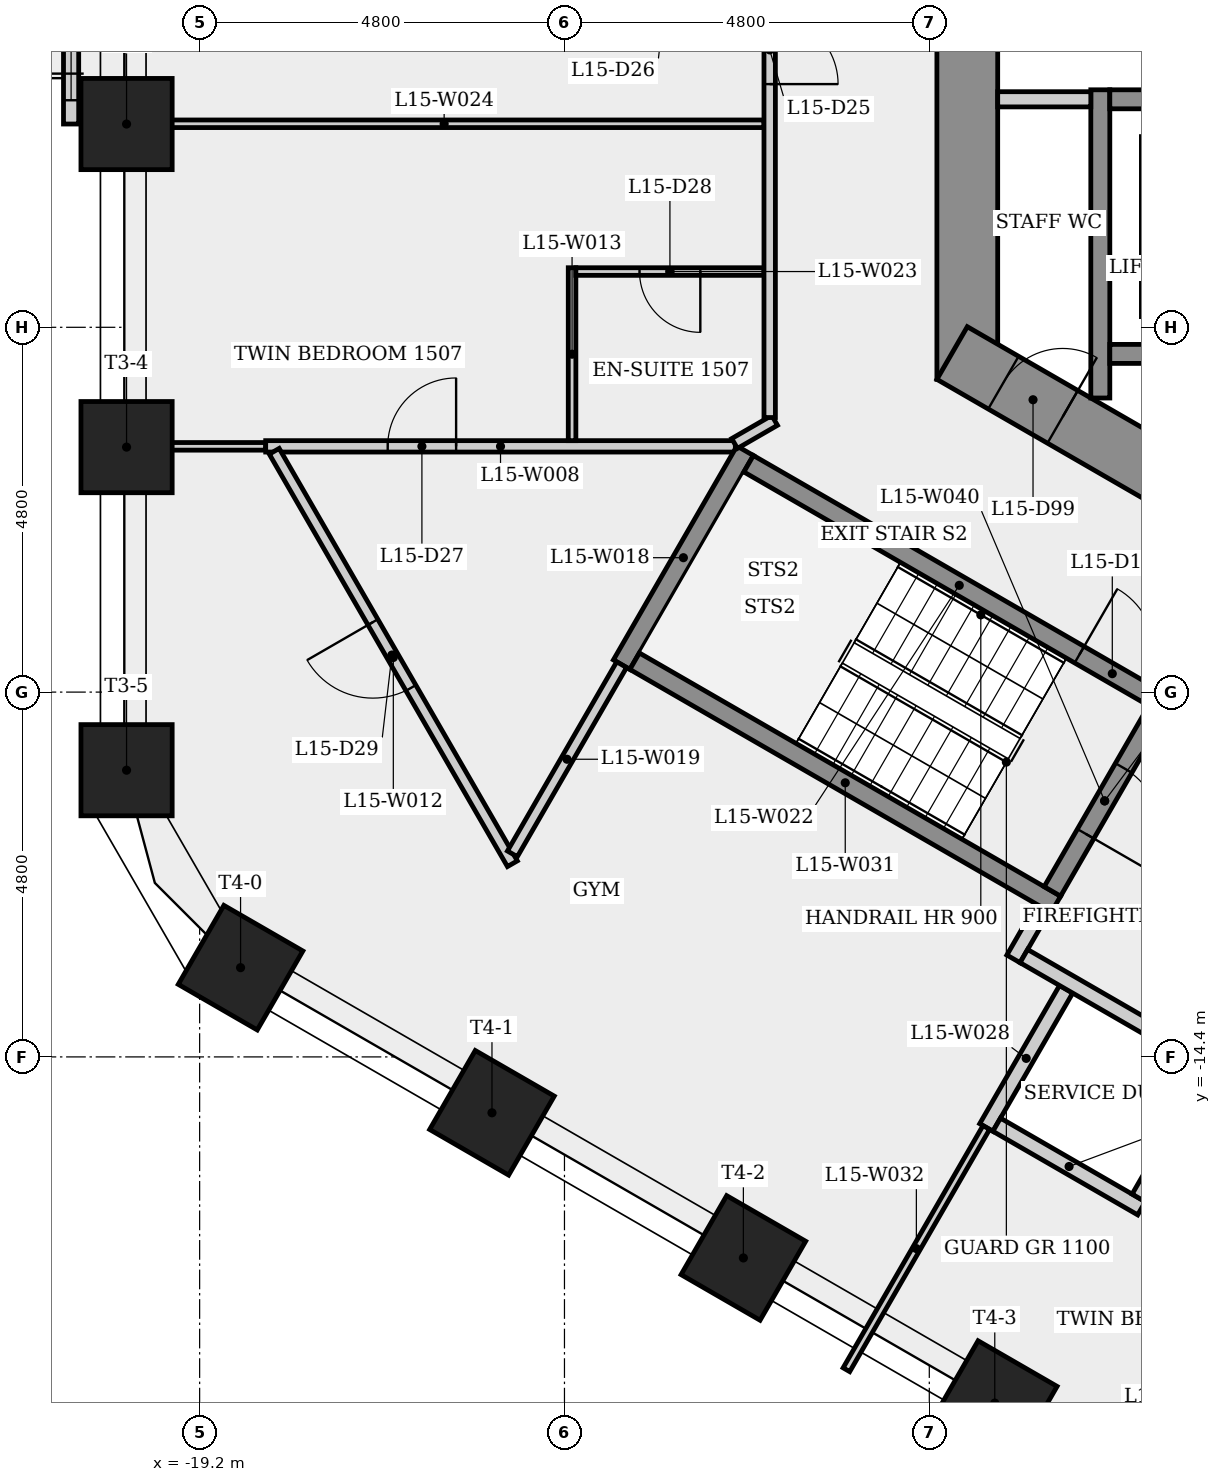
"""IFC4 building model, lengths in metres.
Left out: names, types, materials, properties, quantities, classifications, styles, units other than length and angle.
Written with IfcOpenShell. Run it as: python <this file> out.ifc"""

import sys

from ifc_helpers import new_model, si_unit, direction, frame, frame_2d, origin, origin_2d, place, context, subcontext, project, spatial, rectangle, extrude, element, fill, save


model = new_model("IFC4")
c1 = context("Model", 3, precision=1e-05, world=origin(), true_north=direction((0.0, 1.0)))
c2 = subcontext(c1, "Body", "Model", "MODEL_VIEW")
j1 = project(units=[si_unit("LENGTHUNIT", "METRE"), si_unit("PLANEANGLEUNIT", "RADIAN")], contexts=[c1])
p1 = place(None, origin())
s1 = spatial("IfcSite", under=j1, at=p1, CompositionType="ELEMENT")
p2 = place(p1, origin())
s2 = spatial("IfcBuilding", under=s1, at=p2, CompositionType="ELEMENT")
p3 = place(p2, frame((0.0, 0.0, 59.5)))
s3 = spatial("IfcBuildingStorey", under=s2, at=p3, CompositionType="ELEMENT", Elevation=59.5)
p4 = place(p3, frame((-9.1, 5.485, 0.0), z_axis=(0.0, 0.0, 1.0), x_axis=(0.0, -1.0, 0.0)))
e1 = element("IfcWall", 1, at=p4, inside=s3, PredefinedType="SHEAR", context=c2, shape_type="SweptSolid", body=[
    extrude(rectangle(XDim=10.97, YDim=0.8, at=frame_2d((5.485, 0.0))), origin(), (0.0, 0.0, 1.0), 3.4),
])
p5 = place(p4, frame((4.685, 0.0, 0.0)))
e2 = element("IfcOpeningElement", 2, at=p5, cuts=e1, PredefinedType="OPENING", context=c2, shape_type="SweptSolid", body=[
    extrude(rectangle(XDim=1.6, YDim=2.1, at=frame_2d((0.8, 1.05))), frame((0.0, 0.41, 0.0), z_axis=(0.0, -1.0, 0.0), x_axis=(1.0, 0.0, 0.0)), (0.0, 0.0, 1.0), 0.82),
])
p6 = place(p3, frame((-9.3, -5.138, 0.0), z_axis=(0.0, 0.0, 1.0), x_axis=(0.866023993627, -0.500002442456, 0.0)))
e3 = element("IfcWall", 3, at=p6, inside=s3, PredefinedType="SHEAR", context=c2, shape_type="SweptSolid", body=[
    extrude(rectangle(XDim=10.97, YDim=0.8, at=frame_2d((5.485, 0.0))), origin(), (0.0, 0.0, 1.0), 3.4),
])
p7 = place(p6, frame((0.78, 0.0, 0.0)))
e4 = element("IfcOpeningElement", 4, at=p7, cuts=e3, PredefinedType="OPENING", context=c2, shape_type="SweptSolid", body=[
    extrude(rectangle(XDim=0.9, YDim=2.1, at=frame_2d((0.45, 1.05))), frame((0.0, 0.41, 0.0), z_axis=(0.0, -1.0, 0.0), x_axis=(1.0, 0.0, 0.0)), (0.0, 0.0, 1.0), 0.82),
])
for number, where, z_axis, x_axis in (
    (5, (-20.161, -2.125, 0.0), (0.0, 0.0, 1.0), (-1.0, 0.0, 0.0)),
    (6, (-20.161, -6.377, 0.0), (0.0, 0.0, 1.0), (-1.0, 0.0, 0.0)),
    (7, (-20.161, -10.628, 0.0), (0.0, 0.0, 1.0), (-1.0, 0.0, 0.0)),
    (8, (-18.661, -13.226, 0.0), (0.0, 0.0, 1.0), (-0.5, -0.866, 0.0)),
    (9, (-15.354, -15.135, 0.0), (0.0, 0.0, 1.0), (-0.5, -0.866, 0.0)),
    (10, (-12.046, -17.045, 0.0), (0.0, 0.0, 1.0), (-0.5, -0.866, 0.0)),
    (11, (-8.739, -18.955, 0.0), (0.0, 0.0, 1.0), (-0.5, -0.866, 0.0)),
):
    element("IfcColumn", number, at=place(p3, frame(where, z_axis=z_axis, x_axis=x_axis)), inside=s3, PredefinedType="COLUMN", context=c2, shape_type="SweptSolid", body=[
        extrude(rectangle(XDim=1.2, YDim=1.2, at=origin_2d()), origin(), (0.0, 0.0, 1.0), 3.4),
    ])
p8 = place(p3, frame((-20.891, 2.126, 0.0), z_axis=(0.0, 0.0, 1.0), x_axis=(0.0, -1.0, 0.0)))
e12 = element("IfcWall", 12, at=p8, inside=s3, PredefinedType="SOLIDWALL", context=c2, shape_type="SweptSolid", body=[
    extrude(rectangle(XDim=4.251, YDim=0.2, at=frame_2d((2.125, 0.0))), origin(), (0.0, 0.0, 1.0), 3.4),
])
p9 = place(p8, frame((1.625, 0.0, 0.0)))
e13 = element("IfcOpeningElement", 13, at=p9, cuts=e12, PredefinedType="OPENING", context=c2, shape_type="SweptSolid", body=[
    extrude(rectangle(XDim=1.0, YDim=2.4, at=frame_2d((0.5, 1.2))), frame((0.0, 0.11, 0.0), z_axis=(0.0, -1.0, 0.0), x_axis=(1.0, 0.0, 0.0)), (0.0, 0.0, 1.0), 0.22),
])
p10 = place(p8, frame((0.313, 0.0, 0.9)))
e14 = element("IfcOpeningElement", 14, at=p10, cuts=e12, PredefinedType="OPENING", context=c2, shape_type="SweptSolid", body=[
    extrude(rectangle(XDim=1.0, YDim=1.5, at=frame_2d((0.5, 0.75))), frame((0.0, 0.11, 0.0), z_axis=(0.0, -1.0, 0.0), x_axis=(1.0, 0.0, 0.0)), (0.0, 0.0, 1.0), 0.22),
])
p11 = place(p8, frame((2.938, 0.0, 0.9)))
e15 = element("IfcOpeningElement", 15, at=p11, cuts=e12, PredefinedType="OPENING", context=c2, shape_type="SweptSolid", body=[
    extrude(rectangle(XDim=1.0, YDim=1.5, at=frame_2d((0.5, 0.75))), frame((0.0, 0.11, 0.0), z_axis=(0.0, -1.0, 0.0), x_axis=(1.0, 0.0, 0.0)), (0.0, 0.0, 1.0), 0.22),
])
p12 = place(p3, frame((-18.331, -6.366, 0.0), z_axis=(0.0, 0.0, 1.0), x_axis=(-1.0, 0.0, 0.0)))
e16 = element("IfcWall", 16, at=p12, inside=s3, PredefinedType="PARTITIONING", context=c2, shape_type="SweptSolid", body=[
    extrude(rectangle(XDim=1.86, YDim=0.1, at=frame_2d((0.93, 0.0))), origin(), (0.0, 0.0, 1.0), 3.05),
])
p13 = place(p3, frame((-18.331, -6.366, 0.0), z_axis=(0.0, 0.0, 1.0), x_axis=(1.0, 0.0, 0.0)))
e17 = element("IfcWall", 17, at=p13, inside=s3, PredefinedType="PARTITIONING", context=c2, shape_type="SweptSolid", body=[
    extrude(rectangle(XDim=6.179, YDim=0.15, at=frame_2d((3.089, 0.0))), origin(), (0.0, 0.0, 1.0), 3.05),
])
p14 = place(p13, frame((1.605, 0.0, 0.0)))
e18 = element("IfcOpeningElement", 18, at=p14, cuts=e17, PredefinedType="OPENING", context=c2, shape_type="SweptSolid", body=[
    extrude(rectangle(XDim=0.9, YDim=2.1, at=frame_2d((0.45, 1.05))), frame((0.0, 0.085, 0.0), z_axis=(0.0, -1.0, 0.0), x_axis=(1.0, 0.0, 0.0)), (0.0, 0.0, 1.0), 0.17),
])
p15 = place(p3, frame((-15.085, -11.858, 0.0), z_axis=(0.0, 0.0, 1.0), x_axis=(-0.500019233215, 0.866014299198, 0.0)))
e19 = element("IfcWall", 19, at=p15, inside=s3, PredefinedType="PARTITIONING", context=c2, shape_type="SweptSolid", body=[
    extrude(rectangle(XDim=6.266, YDim=0.15, at=frame_2d((3.133, 0.0))), origin(), (0.0, 0.0, 1.0), 3.05),
])
p16 = place(p15, frame((2.671, 0.0, 0.0)))
e20 = element("IfcOpeningElement", 20, at=p16, cuts=e19, PredefinedType="OPENING", context=c2, shape_type="SweptSolid", body=[
    extrude(rectangle(XDim=1.0, YDim=2.1, at=frame_2d((0.5, 1.05))), frame((0.0, 0.085, 0.0), z_axis=(0.0, -1.0, 0.0), x_axis=(1.0, 0.0, 0.0)), (0.0, 0.0, 1.0), 0.17),
])
p17 = place(p3, frame((-14.3, -4.016, 0.0), z_axis=(0.0, 0.0, 1.0), x_axis=(0.0, -1.0, 0.0)))
e21 = element("IfcWall", 21, at=p17, inside=s3, PredefinedType="PARTITIONING", context=c2, shape_type="SweptSolid", body=[
    extrude(rectangle(XDim=2.275, YDim=0.1, at=frame_2d((1.138, 0.0))), origin(), (0.0, 0.0, 1.0), 3.05),
])
p18 = place(p3, frame((-13.648, -9.239, 0.0), z_axis=(0.0, 0.0, 1.0), x_axis=(0.500017246033, 0.866015446554, 0.0)))
e22 = element("IfcWall", 22, at=p18, inside=s3, PredefinedType="SHEAR", context=c2, shape_type="SweptSolid", body=[
    extrude(rectangle(XDim=3.25, YDim=0.25, at=frame_2d((1.625, 0.0))), origin(), (0.0, 0.0, 1.0), 3.05),
])
p19 = place(p3, frame((-13.648, -9.239, 0.0), z_axis=(0.0, 0.0, 1.0), x_axis=(-0.500048363171, -0.865997479494, 0.0)))
e23 = element("IfcWall", 23, at=p19, inside=s3, PredefinedType="PARTITIONING", context=c2, shape_type="SweptSolid", body=[
    extrude(rectangle(XDim=2.875, YDim=0.15, at=frame_2d((1.438, 0.0))), origin(), (0.0, 0.0, 1.0), 3.05),
])
p20 = place(p3, frame((-12.162, -6.329, 0.0), z_axis=(0.0, 0.0, 1.0), x_axis=(0.866011828767, 0.500023511883, 0.0)))
e24 = element("IfcWall", 24, at=p20, inside=s3, PredefinedType="PARTITIONING", context=c2, shape_type="SweptSolid", body=[
    extrude(rectangle(XDim=0.608, YDim=0.15, at=frame_2d((0.304, 0.0))), origin(), (0.0, 0.0, 1.0), 3.05),
])
p21 = place(p3, frame((-11.977, -6.595, 0.0), z_axis=(0.0, 0.0, 1.0), x_axis=(0.866025499775, -0.499999833739, 0.0)))
e25 = element("IfcWall", 25, at=p21, inside=s3, PredefinedType="SHEAR", context=c2, shape_type="SweptSolid", body=[
    extrude(rectangle(XDim=6.4, YDim=0.25, at=frame_2d((3.2, 0.0))), origin(), (0.0, 0.0, 1.0), 3.05),
])
p22 = place(p21, frame((5.025, 0.0, 0.0)))
e26 = element("IfcOpeningElement", 26, at=p22, cuts=e25, PredefinedType="OPENING", context=c2, shape_type="SweptSolid", body=[
    extrude(rectangle(XDim=1.0, YDim=2.1, at=frame_2d((0.5, 1.05))), frame((0.0, 0.135, 0.0), z_axis=(0.0, -1.0, 0.0), x_axis=(1.0, 0.0, 0.0)), (0.0, 0.0, 1.0), 0.27),
])
p23 = place(p3, frame((-11.775, -4.066, 0.0), z_axis=(0.0, 0.0, 1.0), x_axis=(-1.0, 0.0, 0.0)))
e27 = element("IfcWall", 27, at=p23, inside=s3, PredefinedType="PARTITIONING", context=c2, shape_type="SweptSolid", body=[
    extrude(rectangle(XDim=2.475, YDim=0.1, at=frame_2d((1.238, 0.0))), origin(), (0.0, 0.0, 1.0), 3.05),
])
p24 = place(p23, frame((0.837, 0.0, 0.0)))
e28 = element("IfcOpeningElement", 28, at=p24, cuts=e27, PredefinedType="OPENING", context=c2, shape_type="SweptSolid", body=[
    extrude(rectangle(XDim=0.8, YDim=2.1, at=frame_2d((0.4, 1.05))), frame((0.0, 0.06, 0.0), z_axis=(0.0, -1.0, 0.0), x_axis=(1.0, 0.0, 0.0)), (0.0, 0.0, 1.0), 0.12),
])
p25 = place(p3, frame((-11.775, -2.122, 0.0), z_axis=(0.0, 0.0, 1.0), x_axis=(-1.0, 0.0, 0.0)))
e29 = element("IfcWall", 29, at=p25, inside=s3, PredefinedType="PARTITIONING", context=c2, shape_type="SweptSolid", body=[
    extrude(rectangle(XDim=8.416, YDim=0.1, at=frame_2d((4.208, 0.0))), origin(), (0.0, 0.0, 1.0), 3.05),
])
p26 = place(p3, frame((-11.7, 6.137, 0.0), z_axis=(0.0, 0.0, 1.0), x_axis=(0.0, -1.0, 0.0)))
e30 = element("IfcWall", 30, at=p26, inside=s3, PredefinedType="PARTITIONING", context=c2, shape_type="SweptSolid", body=[
    extrude(rectangle(XDim=12.125, YDim=0.15, at=frame_2d((6.062, 0.0))), origin(), (0.0, 0.0, 1.0), 3.05),
])
p27 = place(p26, frame((6.837, 0.0, 0.0)))
e31 = element("IfcOpeningElement", 31, at=p27, cuts=e30, PredefinedType="OPENING", context=c2, shape_type="SweptSolid", body=[
    extrude(rectangle(XDim=0.9, YDim=2.1, at=frame_2d((0.45, 1.05))), frame((0.0, 0.085, 0.0), z_axis=(0.0, -1.0, 0.0), x_axis=(1.0, 0.0, 0.0)), (0.0, 0.0, 1.0), 0.17),
])
p28 = place(p3, frame((-8.85, -15.329, 0.0), z_axis=(0.0, 0.0, 1.0), x_axis=(0.500027713859, 0.866009402589, 0.0)))
e32 = element("IfcWall", 32, at=p28, inside=s3, PredefinedType="PLUMBINGWALL", context=c2, shape_type="SweptSolid", body=[
    extrude(rectangle(XDim=2.1, YDim=0.2, at=frame_2d((1.05, 0.0))), origin(), (0.0, 0.0, 1.0), 3.05),
])
p29 = place(p3, frame((-8.493, -13.11, 0.0), z_axis=(0.0, 0.0, 1.0), x_axis=(0.500067724834, 0.865986299303, 0.0)))
e33 = element("IfcWall", 33, at=p29, inside=s3, PredefinedType="PARTITIONING", context=c2, shape_type="SweptSolid", body=[
    extrude(rectangle(XDim=0.775, YDim=0.2, at=frame_2d((0.388, 0.0))), origin(), (0.0, 0.0, 1.0), 3.05),
])
p30 = place(p3, frame((-7.935, -12.393, 0.0), z_axis=(0.0, 0.0, 1.0), x_axis=(-0.866025499775, 0.499999833739, 0.0)))
e34 = element("IfcWall", 34, at=p30, inside=s3, PredefinedType="SHEAR", context=c2, shape_type="SweptSolid", body=[
    extrude(rectangle(XDim=6.4, YDim=0.25, at=frame_2d((3.2, 0.0))), origin(), (0.0, 0.0, 1.0), 3.05),
])
p31 = place(p3, frame((-10.69, -18.516, 0.0), z_axis=(0.0, 0.0, 1.0), x_axis=(0.499955964762, 0.866050826049, 0.0)))
e35 = element("IfcWall", 35, at=p31, inside=s3, PredefinedType="PARTITIONING", context=c2, shape_type="SweptSolid", body=[
    extrude(rectangle(XDim=3.68, YDim=0.1, at=frame_2d((1.84, 0.0))), origin(), (0.0, 0.0, 1.0), 3.05),
])
p32 = place(p3, frame((-8.356, -13.073, 0.0), z_axis=(0.0, 0.0, 1.0), x_axis=(0.866038532462, -0.499977259774, 0.0)))
e36 = element("IfcWall", 36, at=p32, inside=s3, PredefinedType="PARTITIONING", context=c2, shape_type="SweptSolid", body=[
    extrude(rectangle(XDim=4.7, YDim=0.2, at=frame_2d((2.35, 0.0))), origin(), (0.0, 0.0, 1.0), 3.05),
])
p33 = place(p3, frame((-7.35, -5.73, 0.0), z_axis=(0.0, 0.0, 1.0), x_axis=(0.0, 1.0, 0.0)))
e37 = element("IfcWall", 37, at=p33, inside=s3, PredefinedType="SHEAR", context=c2, shape_type="SweptSolid", body=[
    extrude(rectangle(XDim=4.055, YDim=0.25, at=frame_2d((2.028, 0.0))), origin(), (0.0, 0.0, 1.0), 3.05),
])
p34 = place(p3, frame((-7.475, -1.8, 0.0), z_axis=(0.0, 0.0, 1.0), x_axis=(-1.0, 0.0, 0.0)))
e38 = element("IfcWall", 38, at=p34, inside=s3, PredefinedType="PARTITIONING", context=c2, shape_type="SweptSolid", body=[
    extrude(rectangle(XDim=1.225, YDim=0.2, at=frame_2d((0.613, 0.0))), origin(), (0.0, 0.0, 1.0), 3.05),
])
p35 = place(p3, frame((-6.808, -16.392, 0.0), z_axis=(0.0, 0.0, 1.0), x_axis=(-0.866008176907, 0.50002983664, 0.0)))
e39 = element("IfcWall", 39, at=p35, inside=s3, PredefinedType="PLUMBINGWALL", context=c2, shape_type="SweptSolid", body=[
    extrude(rectangle(XDim=2.2, YDim=0.2, at=frame_2d((1.1, 0.0))), origin(), (0.0, 0.0, 1.0), 3.05),
])
p36 = place(p3, frame((-6.605, -9.841, 0.0), z_axis=(0.0, 0.0, 1.0), x_axis=(-0.499996545922, -0.866027397988, 0.0)))
e40 = element("IfcWall", 40, at=p36, inside=s3, PredefinedType="SHEAR", context=c2, shape_type="SweptSolid", body=[
    extrude(rectangle(XDim=2.75, YDim=0.25, at=frame_2d((1.375, 0.0))), origin(), (0.0, 0.0, 1.0), 3.05),
])
p37 = place(p36, frame((0.875, 0.0, 0.0)))
e41 = element("IfcOpeningElement", 41, at=p37, cuts=e40, PredefinedType="OPENING", context=c2, shape_type="SweptSolid", body=[
    extrude(rectangle(XDim=1.0, YDim=2.1, at=frame_2d((0.5, 1.05))), frame((0.0, 0.135, 0.0), z_axis=(0.0, -1.0, 0.0), x_axis=(1.0, 0.0, 0.0)), (0.0, 0.0, 1.0), 0.27),
])
p38 = place(p3, frame((-5.895, -14.61, 0.0), z_axis=(0.0, 0.0, 1.0), x_axis=(-0.500022797313, -0.86601224135, 0.0)))
e42 = element("IfcWall", 42, at=p38, inside=s3, PredefinedType="PLUMBINGWALL", context=c2, shape_type="SweptSolid", body=[
    extrude(rectangle(XDim=1.9, YDim=0.2, at=frame_2d((0.95, 0.0))), origin(), (0.0, 0.0, 1.0), 3.05),
])
p39 = place(p3, frame((-7.225, -5.15, 0.0), z_axis=(0.0, 0.0, 1.0), x_axis=(1.0, 0.0, 0.0)))
e43 = element("IfcWall", 43, at=p39, inside=s3, PredefinedType="SHEAR", context=c2, shape_type="SweptSolid", body=[
    extrude(rectangle(XDim=14.7, YDim=0.25, at=frame_2d((7.35, 0.0))), origin(), (0.0, 0.0, 1.0), 3.05),
])
p40 = place(p3, frame((-7.225, -1.8, 0.0), z_axis=(0.0, 0.0, 1.0), x_axis=(1.0, 0.0, 0.0)))
e44 = element("IfcWall", 44, at=p40, inside=s3, PredefinedType="SHEAR", context=c2, shape_type="SweptSolid", body=[
    extrude(rectangle(XDim=14.7, YDim=0.25, at=frame_2d((7.35, 0.0))), origin(), (0.0, 0.0, 1.0), 3.05),
])
p41 = place(p40, frame((0.597, 0.0, 0.0)))
e45 = element("IfcOpeningElement", 45, at=p41, cuts=e44, PredefinedType="OPENING", context=c2, shape_type="SweptSolid", body=[
    extrude(rectangle(XDim=1.1, YDim=2.1, at=frame_2d((0.55, 1.05))), frame((0.0, 0.135, 0.0), z_axis=(0.0, -1.0, 0.0), x_axis=(1.0, 0.0, 0.0)), (0.0, 0.0, 1.0), 0.27),
])
p42 = place(p40, frame((3.0, 0.0, 0.0)))
e46 = element("IfcOpeningElement", 46, at=p42, cuts=e44, PredefinedType="OPENING", context=c2, shape_type="SweptSolid", body=[
    extrude(rectangle(XDim=1.1, YDim=2.1, at=frame_2d((0.55, 1.05))), frame((0.0, 0.135, 0.0), z_axis=(0.0, -1.0, 0.0), x_axis=(1.0, 0.0, 0.0)), (0.0, 0.0, 1.0), 0.27),
])
p43 = place(p40, frame((5.45, 0.0, 0.0)))
e47 = element("IfcOpeningElement", 47, at=p43, cuts=e44, PredefinedType="OPENING", context=c2, shape_type="SweptSolid", body=[
    extrude(rectangle(XDim=1.1, YDim=2.1, at=frame_2d((0.55, 1.05))), frame((0.0, 0.135, 0.0), z_axis=(0.0, -1.0, 0.0), x_axis=(1.0, 0.0, 0.0)), (0.0, 0.0, 1.0), 0.27),
])
p44 = place(p40, frame((7.9, 0.0, 0.0)))
e48 = element("IfcOpeningElement", 48, at=p44, cuts=e44, PredefinedType="OPENING", context=c2, shape_type="SweptSolid", body=[
    extrude(rectangle(XDim=1.1, YDim=2.1, at=frame_2d((0.55, 1.05))), frame((0.0, 0.135, 0.0), z_axis=(0.0, -1.0, 0.0), x_axis=(1.0, 0.0, 0.0)), (0.0, 0.0, 1.0), 0.27),
])
p45 = place(p40, frame((10.35, 0.0, 0.0)))
e49 = element("IfcOpeningElement", 49, at=p45, cuts=e44, PredefinedType="OPENING", context=c2, shape_type="SweptSolid", body=[
    extrude(rectangle(XDim=1.1, YDim=2.1, at=frame_2d((0.55, 1.05))), frame((0.0, 0.135, 0.0), z_axis=(0.0, -1.0, 0.0), x_axis=(1.0, 0.0, 0.0)), (0.0, 0.0, 1.0), 0.27),
])
p46 = place(p11, origin())
e50 = element("IfcWindow", 50, at=p46, inside=s3, PartitioningType="SINGLE_PANEL", PredefinedType="WINDOW", context=c2, shape_type="SweptSolid", body=[
    extrude(rectangle(XDim=1.0, YDim=1.5, at=frame_2d((0.5, 0.75))), frame((0.0, 0.03, 0.0), z_axis=(0.0, -1.0, 0.0), x_axis=(1.0, 0.0, 0.0)), (0.0, 0.0, 1.0), 0.06),
])
fill(e15, e50)
p47 = place(p22, origin())
e51 = element("IfcDoor", 51, at=p47, inside=s3, OperationType="SINGLE_SWING_LEFT", PredefinedType="DOOR", context=c2, shape_type="SweptSolid", body=[
    extrude(rectangle(XDim=1.0, YDim=2.1, at=frame_2d((0.5, 1.05))), frame((0.0, 0.025, 0.0), z_axis=(0.0, -1.0, 0.0), x_axis=(1.0, 0.0, 0.0)), (0.0, 0.0, 1.0), 0.05),
])
fill(e26, e51)
p48 = place(p37, origin())
e52 = element("IfcDoor", 52, at=p48, inside=s3, OperationType="SINGLE_SWING_RIGHT", PredefinedType="DOOR", context=c2, shape_type="SweptSolid", body=[
    extrude(rectangle(XDim=1.0, YDim=2.1, at=frame_2d((0.5, 1.05))), frame((0.0, 0.025, 0.0), z_axis=(0.0, -1.0, 0.0), x_axis=(1.0, 0.0, 0.0)), (0.0, 0.0, 1.0), 0.05),
])
fill(e41, e52)
p49 = place(p27, origin())
e53 = element("IfcDoor", 53, at=p49, inside=s3, OperationType="SINGLE_SWING_RIGHT", PredefinedType="DOOR", context=c2, shape_type="SweptSolid", body=[
    extrude(rectangle(XDim=0.9, YDim=2.1, at=frame_2d((0.45, 1.05))), frame((0.0, 0.025, 0.0), z_axis=(0.0, -1.0, 0.0), x_axis=(1.0, 0.0, 0.0)), (0.0, 0.0, 1.0), 0.05),
])
fill(e31, e53)
p50 = place(p14, origin())
e54 = element("IfcDoor", 54, at=p50, inside=s3, OperationType="SINGLE_SWING_RIGHT", PredefinedType="DOOR", context=c2, shape_type="SweptSolid", body=[
    extrude(rectangle(XDim=0.9, YDim=2.1, at=frame_2d((0.45, 1.05))), frame((0.0, 0.025, 0.0), z_axis=(0.0, -1.0, 0.0), x_axis=(1.0, 0.0, 0.0)), (0.0, 0.0, 1.0), 0.05),
])
fill(e18, e54)
p51 = place(p24, origin())
e55 = element("IfcDoor", 55, at=p51, inside=s3, OperationType="SINGLE_SWING_LEFT", PredefinedType="DOOR", context=c2, shape_type="SweptSolid", body=[
    extrude(rectangle(XDim=0.8, YDim=2.1, at=frame_2d((0.4, 1.05))), frame((0.0, 0.025, 0.0), z_axis=(0.0, -1.0, 0.0), x_axis=(1.0, 0.0, 0.0)), (0.0, 0.0, 1.0), 0.05),
])
fill(e28, e55)
p52 = place(p16, origin())
e56 = element("IfcDoor", 56, at=p52, inside=s3, OperationType="SINGLE_SWING_RIGHT", PredefinedType="DOOR", context=c2, shape_type="SweptSolid", body=[
    extrude(rectangle(XDim=1.0, YDim=2.1, at=frame_2d((0.5, 1.05))), frame((0.0, 0.025, 0.0), z_axis=(0.0, -1.0, 0.0), x_axis=(1.0, 0.0, 0.0)), (0.0, 0.0, 1.0), 0.05),
])
fill(e20, e56)
p53 = place(p7, origin())
e57 = element("IfcDoor", 57, at=p53, inside=s3, OperationType="SINGLE_SWING_RIGHT", PredefinedType="DOOR", context=c2, shape_type="SweptSolid", body=[
    extrude(rectangle(XDim=0.9, YDim=2.1, at=frame_2d((0.45, 1.05))), frame((0.0, 0.025, 0.0), z_axis=(0.0, -1.0, 0.0), x_axis=(1.0, 0.0, 0.0)), (0.0, 0.0, 1.0), 0.05),
])
fill(e4, e57)
save(model, sys.argv[1])
